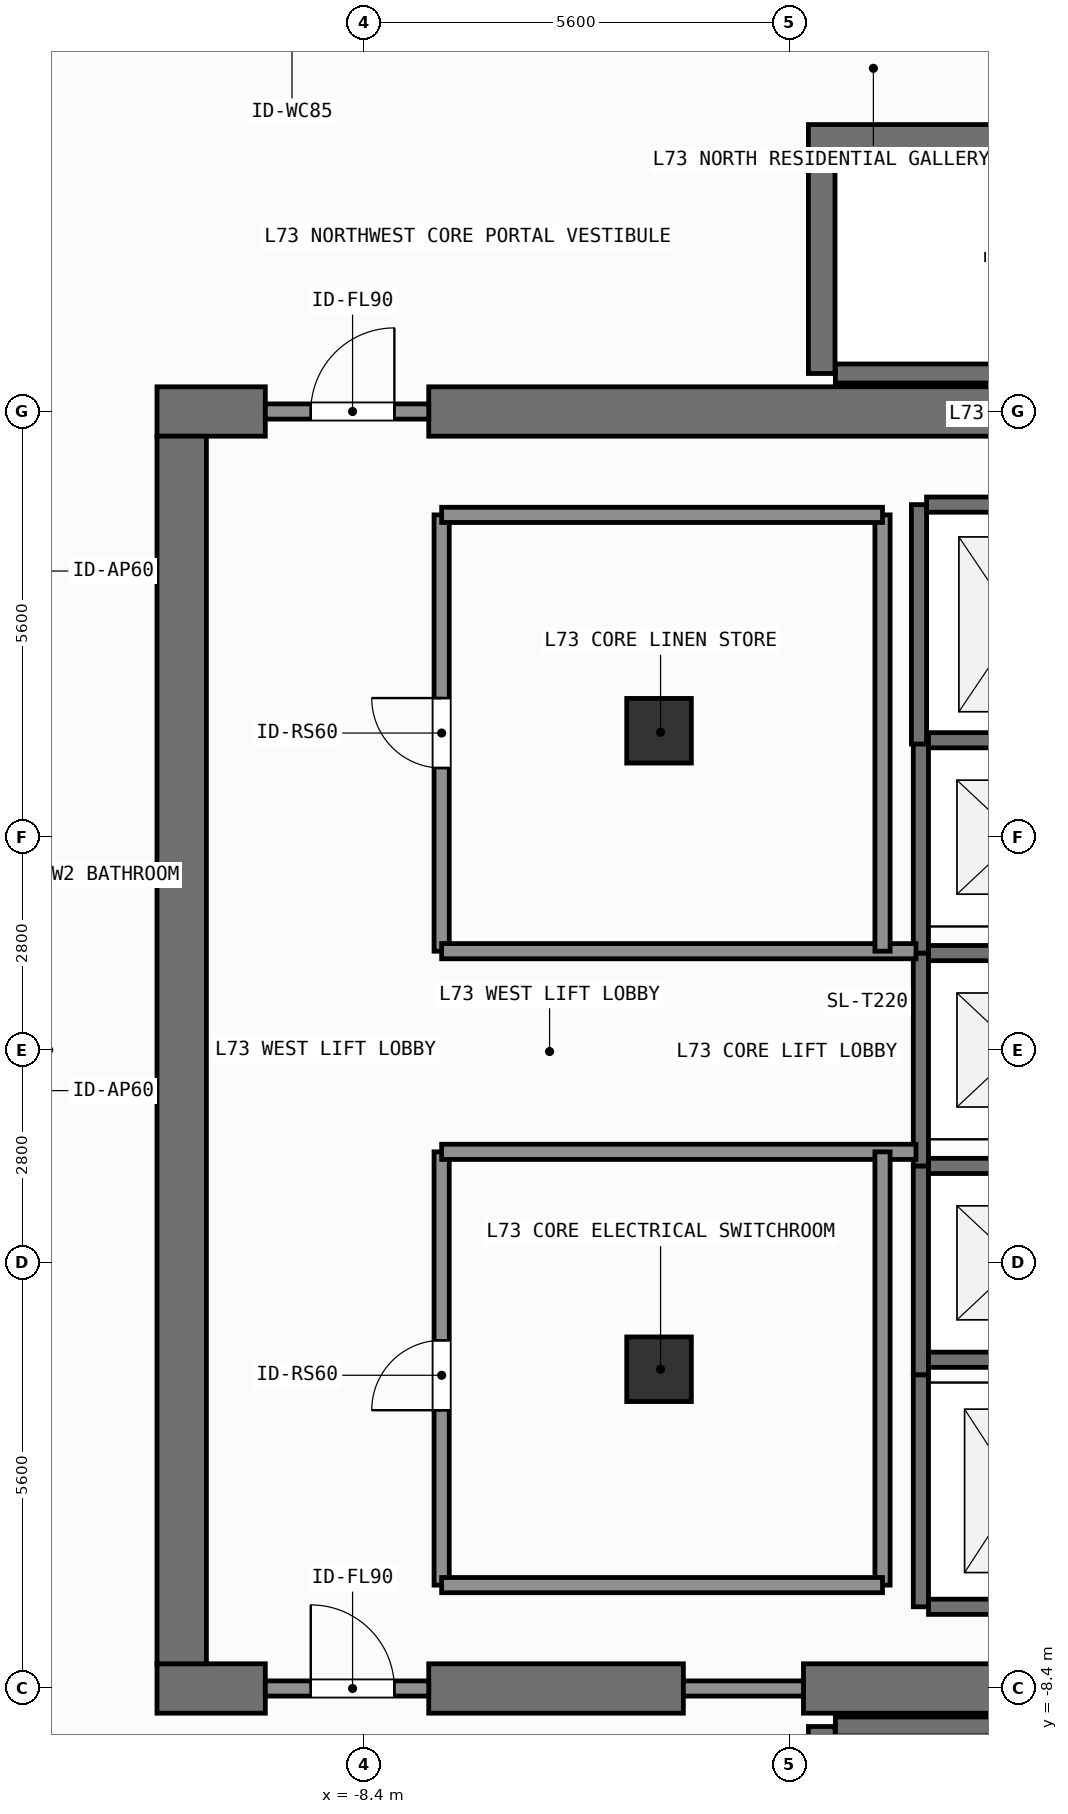
"""IFC4 building model, lengths in metres.
Left out: names, types, materials, properties, quantities, classifications, styles, units other than length and angle.
Written with IfcOpenShell. Run it as: python <this file> out.ifc"""

import sys

from ifc_helpers import new_model, si_unit, direction, frame, frame_2d, origin, origin_2d, place, context, subcontext, project, spatial, rectangle, extrude, element, fill, save


model = new_model("IFC4")
c1 = context("Model", 3, precision=1e-05, world=origin(), true_north=direction((0.0, 1.0)))
c2 = subcontext(c1, "Body", "Model", "MODEL_VIEW")
j1 = project(units=[si_unit("LENGTHUNIT", "METRE"), si_unit("PLANEANGLEUNIT", "RADIAN")], contexts=[c1])
p1 = place(None, origin())
s1 = spatial("IfcSite", under=j1, at=p1, CompositionType="ELEMENT")
p2 = place(p1, origin())
s2 = spatial("IfcBuilding", under=s1, at=p2, CompositionType="ELEMENT")
p3 = place(p2, frame((0.0, 0.0, 297.6)))
s3 = spatial("IfcBuildingStorey", under=s2, at=p3, CompositionType="ELEMENT", Elevation=297.6)
p4 = place(p3, frame((-11.125, -8.4, 0.0), z_axis=(0.0, 0.0, 1.0), x_axis=(1.0, 0.0, 0.0)))
e1 = element("IfcWall", 1, at=p4, inside=s3, PredefinedType="SHEAR", context=c2, shape_type="SweptSolid", body=[
    extrude(rectangle(XDim=1.425, YDim=0.65, at=frame_2d((0.712, 0.0))), origin(), (0.0, 0.0, 1.0), 3.9),
])
p5 = place(p3, frame((-7.55, -8.4, 0.0), z_axis=(0.0, 0.0, 1.0), x_axis=(1.0, 0.0, 0.0)))
e2 = element("IfcWall", 2, at=p5, inside=s3, PredefinedType="SHEAR", context=c2, shape_type="SweptSolid", body=[
    extrude(rectangle(XDim=3.35, YDim=0.65, at=frame_2d((1.675, 0.0))), origin(), (0.0, 0.0, 1.0), 3.9),
])
p6 = place(p3, frame((-2.62, -8.4, 0.0), z_axis=(0.0, 0.0, 1.0), x_axis=(1.0, 0.0, 0.0)))
e3 = element("IfcWall", 3, at=p6, inside=s3, PredefinedType="SHEAR", context=c2, shape_type="SweptSolid", body=[
    extrude(rectangle(XDim=7.27, YDim=0.65, at=frame_2d((3.635, 0.0))), origin(), (0.0, 0.0, 1.0), 3.9),
])
p7 = place(p3, frame((-11.125, 8.4, 0.0), z_axis=(0.0, 0.0, 1.0), x_axis=(1.0, 0.0, 0.0)))
e4 = element("IfcWall", 4, at=p7, inside=s3, PredefinedType="SHEAR", context=c2, shape_type="SweptSolid", body=[
    extrude(rectangle(XDim=1.425, YDim=0.65, at=frame_2d((0.712, 0.0))), origin(), (0.0, 0.0, 1.0), 3.9),
])
p8 = place(p3, frame((-7.55, 8.4, 0.0), z_axis=(0.0, 0.0, 1.0), x_axis=(1.0, 0.0, 0.0)))
e5 = element("IfcWall", 5, at=p8, inside=s3, PredefinedType="SHEAR", context=c2, shape_type="SweptSolid", body=[
    extrude(rectangle(XDim=16.275, YDim=0.65, at=frame_2d((8.138, 0.0))), origin(), (0.0, 0.0, 1.0), 3.9),
])
p9 = place(p3, frame((-10.8, -8.075, 0.0), z_axis=(0.0, 0.0, 1.0), x_axis=(0.0, 1.0, 0.0)))
e6 = element("IfcWall", 6, at=p9, inside=s3, PredefinedType="SHEAR", context=c2, shape_type="SweptSolid", body=[
    extrude(rectangle(XDim=16.15, YDim=0.65, at=frame_2d((8.075, 0.0))), origin(), (0.0, 0.0, 1.0), 3.9),
])
p10 = place(p3, frame((-2.2, -8.9, 0.0), z_axis=(0.0, 0.0, 1.0), x_axis=(1.0, 0.0, 0.0)))
e7 = element("IfcWall", 7, at=p10, inside=s3, PredefinedType="SHEAR", context=c2, shape_type="SweptSolid", body=[
    extrude(rectangle(XDim=6.6, YDim=0.25, at=frame_2d((3.3, 0.0))), origin(), (0.0, 0.0, 1.0), 3.9),
])
p11 = place(p3, frame((-2.38, -11.825, 0.0), z_axis=(0.0, 0.0, 1.0), x_axis=(0.0, 1.0, 0.0)))
e8 = element("IfcWall", 8, at=p11, inside=s3, PredefinedType="SHEAR", context=c2, shape_type="SweptSolid", body=[
    extrude(rectangle(XDim=2.925, YDim=0.35, at=frame_2d((1.462, 0.0))), origin(), (0.0, 0.0, 1.0), 3.9),
])
p12 = place(p3, frame((-2.555, 12.0, 0.0), z_axis=(0.0, 0.0, 1.0), x_axis=(1.0, 0.0, 0.0)))
e9 = element("IfcWall", 9, at=p12, inside=s3, PredefinedType="SHEAR", context=c2, shape_type="SweptSolid", body=[
    extrude(rectangle(XDim=7.31, YDim=0.35, at=frame_2d((3.655, 0.0))), origin(), (0.0, 0.0, 1.0), 3.9),
])
p13 = place(p3, frame((-2.2, 8.9, 0.0), z_axis=(0.0, 0.0, 1.0), x_axis=(1.0, 0.0, 0.0)))
e10 = element("IfcWall", 10, at=p13, inside=s3, PredefinedType="SHEAR", context=c2, shape_type="SweptSolid", body=[
    extrude(rectangle(XDim=6.6, YDim=0.25, at=frame_2d((3.3, 0.0))), origin(), (0.0, 0.0, 1.0), 3.9),
])
p14 = place(p3, frame((-2.38, 8.9, 0.0), z_axis=(0.0, 0.0, 1.0), x_axis=(0.0, 1.0, 0.0)))
e11 = element("IfcWall", 11, at=p14, inside=s3, PredefinedType="SHEAR", context=c2, shape_type="SweptSolid", body=[
    extrude(rectangle(XDim=2.925, YDim=0.35, at=frame_2d((1.462, 0.0))), origin(), (0.0, 0.0, 1.0), 3.9),
])
for number, where, z_axis, x_axis in (
    (12, (-4.52, -4.2, 0.0), (0.0, 0.0, 1.0), (1.0, 0.0, 0.0)),
    (13, (-4.52, 4.2, 0.0), (0.0, 0.0, 1.0), (1.0, 0.0, 0.0)),
):
    element("IfcColumn", number, at=place(p3, frame(where, z_axis=z_axis, x_axis=x_axis)), inside=s3, PredefinedType="COLUMN", context=c2, shape_type="SweptSolid", body=[
        extrude(rectangle(XDim=0.85, YDim=0.85, at=origin_2d()), origin(), (0.0, 0.0, 1.0), 3.9),
    ])
p15 = place(p3, frame((-1.075, -4.275, 0.0), z_axis=(0.0, 0.0, 1.0), x_axis=(0.0, 1.0, 0.0)))
e14 = element("IfcWall", 14, at=p15, inside=s3, PredefinedType="SHEAR", context=c2, shape_type="SweptSolid", body=[
    extrude(rectangle(XDim=2.75, YDim=0.2, at=frame_2d((1.375, 0.0))), origin(), (0.0, 0.0, 1.0), 3.68),
])
for number, where, z_axis, x_axis in (
    (15, (-0.975, -4.075, 0.0), (0.0, 0.0, 1.0), (1.0, 0.0, 0.0)),
    (16, (-0.975, -1.525, 0.0), (0.0, 0.0, 1.0), (1.0, 0.0, 0.0)),
):
    element("IfcWall", number, at=place(p3, frame(where, z_axis=z_axis, x_axis=x_axis)), inside=s3, PredefinedType="SHEAR", context=c2, shape_type="SweptSolid", body=[
        extrude(rectangle(XDim=2.35, YDim=0.2, at=frame_2d((1.175, 0.0))), origin(), (0.0, 0.0, 1.0), 3.68),
    ])
p16 = place(p3, frame((-1.075, -1.525, 0.0), z_axis=(0.0, 0.0, 1.0), x_axis=(0.0, 1.0, 0.0)))
e17 = element("IfcWall", 17, at=p16, inside=s3, PredefinedType="SHEAR", context=c2, shape_type="SweptSolid", body=[
    extrude(rectangle(XDim=2.8, YDim=0.2, at=frame_2d((1.4, 0.0))), origin(), (0.0, 0.0, 1.0), 3.68),
])
p17 = place(p3, frame((-0.975, 1.275, 0.0), z_axis=(0.0, 0.0, 1.0), x_axis=(1.0, 0.0, 0.0)))
e18 = element("IfcWall", 18, at=p17, inside=s3, PredefinedType="SHEAR", context=c2, shape_type="SweptSolid", body=[
    extrude(rectangle(XDim=2.35, YDim=0.2, at=frame_2d((1.175, 0.0))), origin(), (0.0, 0.0, 1.0), 3.68),
])
p18 = place(p3, frame((-1.075, 1.275, 0.0), z_axis=(0.0, 0.0, 1.0), x_axis=(0.0, 1.0, 0.0)))
e19 = element("IfcWall", 19, at=p18, inside=s3, PredefinedType="SHEAR", context=c2, shape_type="SweptSolid", body=[
    extrude(rectangle(XDim=2.8, YDim=0.2, at=frame_2d((1.4, 0.0))), origin(), (0.0, 0.0, 1.0), 3.68),
])
p19 = place(p3, frame((-0.975, 4.075, 0.0), z_axis=(0.0, 0.0, 1.0), x_axis=(1.0, 0.0, 0.0)))
e20 = element("IfcWall", 20, at=p19, inside=s3, PredefinedType="SHEAR", context=c2, shape_type="SweptSolid", body=[
    extrude(rectangle(XDim=2.35, YDim=0.2, at=frame_2d((1.175, 0.0))), origin(), (0.0, 0.0, 1.0), 3.68),
])
p20 = place(p3, frame((-1.1, 4.025, 0.0), z_axis=(0.0, 0.0, 1.0), x_axis=(0.0, 1.0, 0.0)))
e21 = element("IfcWall", 21, at=p20, inside=s3, PredefinedType="SHEAR", context=c2, shape_type="SweptSolid", body=[
    extrude(rectangle(XDim=3.15, YDim=0.2, at=frame_2d((1.575, 0.0))), origin(), (0.0, 0.0, 1.0), 3.68),
])
p21 = place(p3, frame((-1.0, 7.175, 0.0), z_axis=(0.0, 0.0, 1.0), x_axis=(1.0, 0.0, 0.0)))
e22 = element("IfcWall", 22, at=p21, inside=s3, PredefinedType="SHEAR", context=c2, shape_type="SweptSolid", body=[
    extrude(rectangle(XDim=2.4, YDim=0.2, at=frame_2d((1.2, 0.0))), origin(), (0.0, 0.0, 1.0), 3.68),
])
p22 = place(p3, frame((-1.075, -7.325, 0.0), z_axis=(0.0, 0.0, 1.0), x_axis=(0.0, 1.0, 0.0)))
e23 = element("IfcWall", 23, at=p22, inside=s3, PredefinedType="SHEAR", context=c2, shape_type="SweptSolid", body=[
    extrude(rectangle(XDim=3.05, YDim=0.2, at=frame_2d((1.525, 0.0))), origin(), (0.0, 0.0, 1.0), 3.68),
])
p23 = place(p3, frame((-0.975, -7.325, 0.0), z_axis=(0.0, 0.0, 1.0), x_axis=(1.0, 0.0, 0.0)))
e24 = element("IfcWall", 24, at=p23, inside=s3, PredefinedType="SHEAR", context=c2, shape_type="SweptSolid", body=[
    extrude(rectangle(XDim=2.35, YDim=0.2, at=frame_2d((1.175, 0.0))), origin(), (0.0, 0.0, 1.0), 3.68),
])
p24 = place(p3, frame((-9.7, -8.4, 0.0), z_axis=(0.0, 0.0, 1.0), x_axis=(1.0, 0.0, 0.0)))
e25 = element("IfcWall", 25, at=p24, inside=s3, PredefinedType="SOLIDWALL", context=c2, shape_type="SweptSolid", body=[
    extrude(rectangle(XDim=2.15, YDim=0.2, at=frame_2d((1.075, 0.0))), origin(), (0.0, 0.0, 1.0), 2.92),
])
p25 = place(p24, frame((0.598, 0.0, 0.0)))
e26 = element("IfcOpeningElement", 26, at=p25, cuts=e25, PredefinedType="OPENING", context=c2, shape_type="SweptSolid", body=[
    extrude(rectangle(XDim=1.1, YDim=2.15, at=frame_2d((0.55, 1.075))), frame((0.0, 0.11, 0.0), z_axis=(0.0, -1.0, 0.0), x_axis=(1.0, 0.0, 0.0)), (0.0, 0.0, 1.0), 0.22),
])
p26 = place(p3, frame((-9.7, 8.4, 0.0), z_axis=(0.0, 0.0, 1.0), x_axis=(1.0, 0.0, 0.0)))
e27 = element("IfcWall", 27, at=p26, inside=s3, PredefinedType="SOLIDWALL", context=c2, shape_type="SweptSolid", body=[
    extrude(rectangle(XDim=2.15, YDim=0.2, at=frame_2d((1.075, 0.0))), origin(), (0.0, 0.0, 1.0), 2.92),
])
p27 = place(p26, frame((0.598, 0.0, 0.0)))
e28 = element("IfcOpeningElement", 28, at=p27, cuts=e27, PredefinedType="OPENING", context=c2, shape_type="SweptSolid", body=[
    extrude(rectangle(XDim=1.1, YDim=2.15, at=frame_2d((0.55, 1.075))), frame((0.0, 0.11, 0.0), z_axis=(0.0, -1.0, 0.0), x_axis=(1.0, 0.0, 0.0)), (0.0, 0.0, 1.0), 0.22),
])
p28 = place(p3, frame((-7.38, -7.04, 0.0), z_axis=(0.0, 0.0, 1.0), x_axis=(0.0, 1.0, 0.0)))
e29 = element("IfcWall", 29, at=p28, inside=s3, PredefinedType="SOLIDWALL", context=c2, shape_type="SweptSolid", body=[
    extrude(rectangle(XDim=5.7, YDim=0.2, at=frame_2d((2.85, 0.0))), origin(), (0.0, 0.0, 1.0), 3.68),
])
p29 = place(p28, frame((2.301, 0.0, 0.0)))
e30 = element("IfcOpeningElement", 30, at=p29, cuts=e29, PredefinedType="OPENING", context=c2, shape_type="SweptSolid", body=[
    extrude(rectangle(XDim=0.92, YDim=2.1, at=frame_2d((0.46, 1.05))), frame((0.0, 0.11, 0.0), z_axis=(0.0, -1.0, 0.0), x_axis=(1.0, 0.0, 0.0)), (0.0, 0.0, 1.0), 0.22),
])
p30 = place(p3, frame((-7.38, 1.3, 0.0), z_axis=(0.0, 0.0, 1.0), x_axis=(0.0, 1.0, 0.0)))
e31 = element("IfcWall", 31, at=p30, inside=s3, PredefinedType="SOLIDWALL", context=c2, shape_type="SweptSolid", body=[
    extrude(rectangle(XDim=5.74, YDim=0.2, at=frame_2d((2.87, 0.0))), origin(), (0.0, 0.0, 1.0), 3.68),
])
p31 = place(p30, frame((2.41, 0.0, 0.0)))
e32 = element("IfcOpeningElement", 32, at=p31, cuts=e31, PredefinedType="OPENING", context=c2, shape_type="SweptSolid", body=[
    extrude(rectangle(XDim=0.92, YDim=2.1, at=frame_2d((0.46, 1.05))), frame((0.0, 0.11, 0.0), z_axis=(0.0, -1.0, 0.0), x_axis=(1.0, 0.0, 0.0)), (0.0, 0.0, 1.0), 0.22),
])
p32 = place(p3, frame((-4.2, -8.4, 0.0), z_axis=(0.0, 0.0, 1.0), x_axis=(1.0, 0.0, 0.0)))
e33 = element("IfcWall", 33, at=p32, inside=s3, PredefinedType="SOLIDWALL", context=c2, shape_type="SweptSolid", body=[
    extrude(rectangle(XDim=1.58, YDim=0.2, at=frame_2d((0.79, 0.0))), origin(), (0.0, 0.0, 1.0), 2.92),
])
for number, where, z_axis, x_axis in (
    (34, (-7.38, -1.34, 0.0), (0.0, 0.0, 1.0), (1.0, 0.0, 0.0)),
    (35, (-7.38, 1.3, 0.0), (0.0, 0.0, 1.0), (1.0, 0.0, 0.0)),
):
    element("IfcWall", number, at=place(p3, frame(where, z_axis=z_axis, x_axis=x_axis)), inside=s3, PredefinedType="SOLIDWALL", context=c2, shape_type="SweptSolid", body=[
        extrude(rectangle(XDim=6.24, YDim=0.2, at=frame_2d((3.12, 0.0))), origin(), (0.0, 0.0, 1.0), 3.68),
    ])
p33 = place(p3, frame((-1.58, -7.04, 0.0), z_axis=(0.0, 0.0, 1.0), x_axis=(0.0, 1.0, 0.0)))
e36 = element("IfcWall", 36, at=p33, inside=s3, PredefinedType="SOLIDWALL", context=c2, shape_type="SweptSolid", body=[
    extrude(rectangle(XDim=5.7, YDim=0.2, at=frame_2d((2.85, 0.0))), origin(), (0.0, 0.0, 1.0), 3.68),
])
p34 = place(p3, frame((-7.38, -7.04, 0.0), z_axis=(0.0, 0.0, 1.0), x_axis=(1.0, 0.0, 0.0)))
e37 = element("IfcWall", 37, at=p34, inside=s3, PredefinedType="SOLIDWALL", context=c2, shape_type="SweptSolid", body=[
    extrude(rectangle(XDim=5.8, YDim=0.2, at=frame_2d((2.9, 0.0))), origin(), (0.0, 0.0, 1.0), 3.68),
])
p35 = place(p3, frame((-1.58, 1.3, 0.0), z_axis=(0.0, 0.0, 1.0), x_axis=(0.0, 1.0, 0.0)))
e38 = element("IfcWall", 38, at=p35, inside=s3, PredefinedType="SOLIDWALL", context=c2, shape_type="SweptSolid", body=[
    extrude(rectangle(XDim=5.74, YDim=0.2, at=frame_2d((2.87, 0.0))), origin(), (0.0, 0.0, 1.0), 3.68),
])
p36 = place(p3, frame((-7.38, 7.04, 0.0), z_axis=(0.0, 0.0, 1.0), x_axis=(1.0, 0.0, 0.0)))
e39 = element("IfcWall", 39, at=p36, inside=s3, PredefinedType="SOLIDWALL", context=c2, shape_type="SweptSolid", body=[
    extrude(rectangle(XDim=5.8, YDim=0.2, at=frame_2d((2.9, 0.0))), origin(), (0.0, 0.0, 1.0), 3.68),
])
p37 = place(p25, origin())
e40 = element("IfcDoor", 40, at=p37, inside=s3, OperationType="SINGLE_SWING_LEFT", PredefinedType="DOOR", context=c2, shape_type="SweptSolid", body=[
    extrude(rectangle(XDim=1.1, YDim=2.15, at=frame_2d((0.55, 1.075))), frame((0.0, 0.025, 0.0), z_axis=(0.0, -1.0, 0.0), x_axis=(1.0, 0.0, 0.0)), (0.0, 0.0, 1.0), 0.05),
])
fill(e26, e40)
p38 = place(p27, origin())
e41 = element("IfcDoor", 41, at=p38, inside=s3, OperationType="SINGLE_SWING_RIGHT", PredefinedType="DOOR", context=c2, shape_type="SweptSolid", body=[
    extrude(rectangle(XDim=1.1, YDim=2.15, at=frame_2d((0.55, 1.075))), frame((0.0, 0.025, 0.0), z_axis=(0.0, -1.0, 0.0), x_axis=(1.0, 0.0, 0.0)), (0.0, 0.0, 1.0), 0.05),
])
fill(e28, e41)
p39 = place(p29, origin())
e42 = element("IfcDoor", 42, at=p39, inside=s3, OperationType="SINGLE_SWING_LEFT", PredefinedType="DOOR", context=c2, shape_type="SweptSolid", body=[
    extrude(rectangle(XDim=0.92, YDim=2.1, at=frame_2d((0.46, 1.05))), frame((0.0, 0.025, 0.0), z_axis=(0.0, -1.0, 0.0), x_axis=(1.0, 0.0, 0.0)), (0.0, 0.0, 1.0), 0.05),
])
fill(e30, e42)
p40 = place(p31, origin())
e43 = element("IfcDoor", 43, at=p40, inside=s3, OperationType="SINGLE_SWING_RIGHT", PredefinedType="DOOR", context=c2, shape_type="SweptSolid", body=[
    extrude(rectangle(XDim=0.92, YDim=2.1, at=frame_2d((0.46, 1.05))), frame((0.0, 0.025, 0.0), z_axis=(0.0, -1.0, 0.0), x_axis=(1.0, 0.0, 0.0)), (0.0, 0.0, 1.0), 0.05),
])
fill(e32, e43)
save(model, sys.argv[1])
